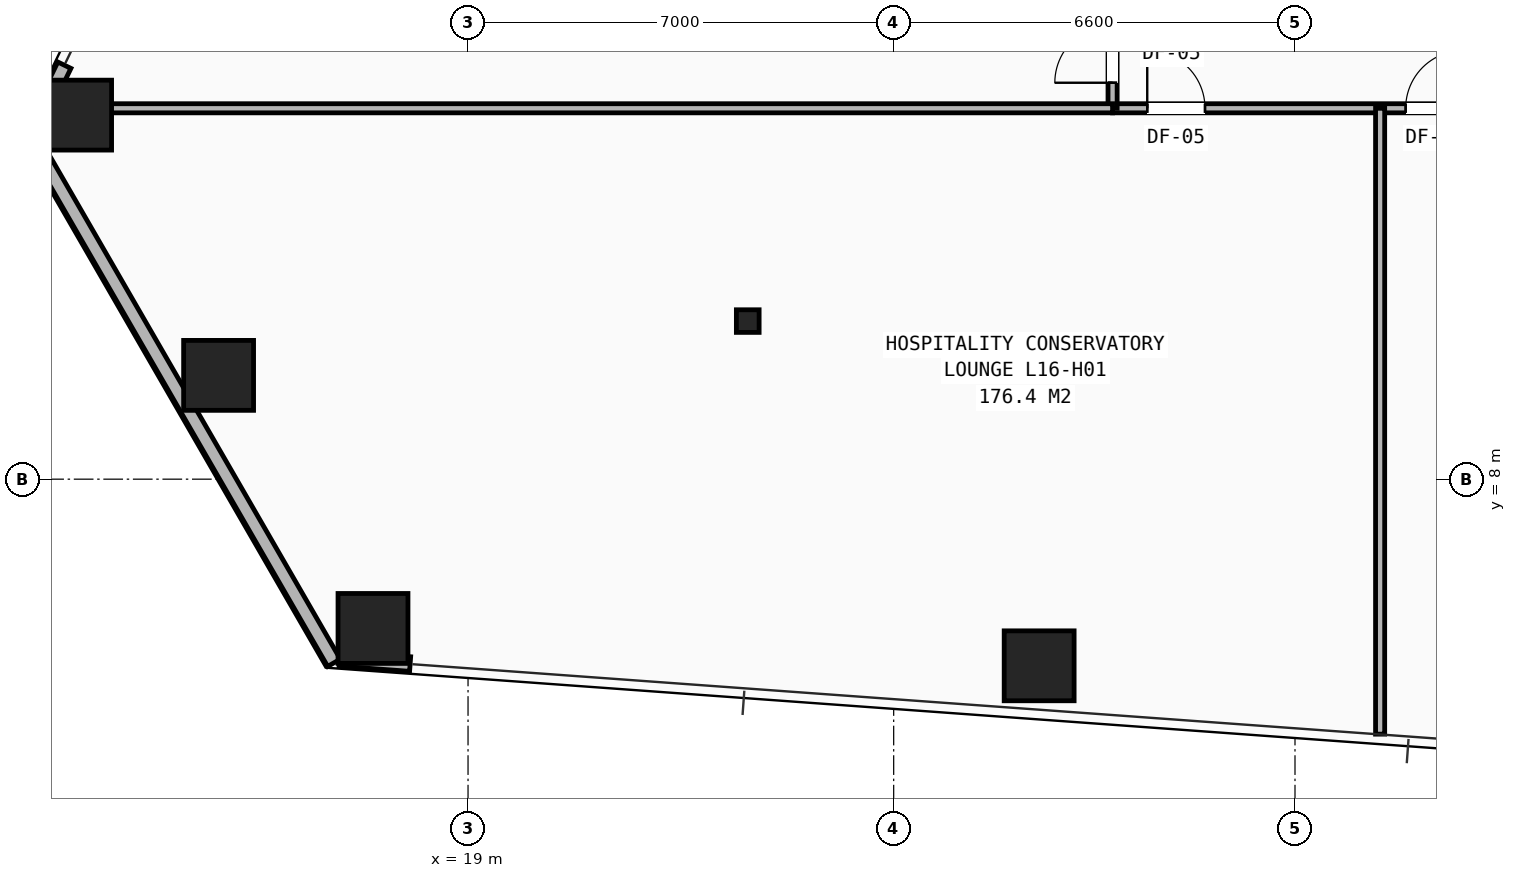
"""IFC4 building model, lengths in metres.
Left out: names, types, materials, properties, quantities, classifications, styles, units other than length and angle.
Written with IfcOpenShell. Run it as: python <this file> out.ifc"""

import sys

from ifc_helpers import new_model, si_unit, direction, frame, frame_2d, origin, origin_2d, place, context, subcontext, project, spatial, rectangle, hollow_rectangle, i_section, extrude, element, fill, save


model = new_model("IFC4")
c1 = context("Model", 3, precision=1e-05, world=origin(), true_north=direction((0.0, 1.0)))
c2 = subcontext(c1, "Body", "Model", "MODEL_VIEW")
j1 = project(units=[si_unit("LENGTHUNIT", "METRE"), si_unit("PLANEANGLEUNIT", "RADIAN")], contexts=[c1])
p1 = place(None, origin())
s1 = spatial("IfcSite", under=j1, at=p1, CompositionType="ELEMENT")
p2 = place(p1, origin())
s2 = spatial("IfcBuilding", under=s1, at=p2, CompositionType="ELEMENT")
p3 = place(p2, frame((0.0, 0.0, 59.2)))
s3 = spatial("IfcBuildingStorey", under=s2, at=p3, CompositionType="ELEMENT", Elevation=59.2)
p4 = place(p3, frame((23.6, 10.6, 0.0), z_axis=(0.0, 0.0, 1.0), x_axis=(1.0, 0.0, 0.0)))
e1 = element("IfcColumn", 1, at=p4, inside=s3, PredefinedType="COLUMN", context=c2, shape_type="SweptSolid", body=[
    extrude(i_section(OverallWidth=0.374, OverallDepth=0.372, WebThickness=0.016, FlangeThickness=0.026, at=origin_2d()), origin(), (0.0, 0.0, 1.0), 3.2),
])
for number, where, z_axis, x_axis in (
    (2, (12.563, 13.988, 0.0), (0.0, 0.0, 1.0), (1.0, 0.0, 0.0)),
    (3, (14.898, 9.707, 0.0), (0.0, 0.0, 1.0), (1.0, 0.0, 0.0)),
    (4, (17.437, 5.545, 0.0), (0.0, 0.0, 1.0), (1.0, 0.0, 0.0)),
    (5, (28.392, 4.93, 0.0), (0.0, 0.0, 1.0), (1.0, 0.0, 0.0)),
):
    element("IfcColumn", number, at=place(p3, frame(where, z_axis=z_axis, x_axis=x_axis)), inside=s3, PredefinedType="COLUMN", context=c2, shape_type="SweptSolid", body=[
        extrude(hollow_rectangle(XDim=1.15, YDim=1.15, WallThickness=0.075, at=origin_2d()), origin(), (0.0, 0.0, 1.0), 3.2),
    ])
p5 = place(p3, frame((12.361, 14.809, 0.0), z_axis=(0.0, 0.0, 1.0), x_axis=(-0.436005533542, -0.899943984213, 0.0)))
e6 = element("IfcWall", 6, at=p5, inside=s3, PredefinedType="SHEAR", context=c2, shape_type="SweptSolid", body=[
    extrude(rectangle(XDim=1.162, YDim=0.24, at=frame_2d((0.581, 0.0))), origin(), (0.0, 0.0, 1.0), 2.263),
])
p6 = place(p3, frame((16.796, 4.98, 0.0), z_axis=(0.0, 0.0, 1.0), x_axis=(-0.499984376209, 0.866034423996, 0.0)))
e7 = element("IfcWall", 7, at=p6, inside=s3, PredefinedType="SHEAR", context=c2, shape_type="SweptSolid", body=[
    extrude(rectangle(XDim=10.086, YDim=0.24, at=frame_2d((5.043, 0.0))), origin(), (0.0, 0.0, 1.0), 2.263),
])
p7 = place(p3, frame((16.888, 5.044, 0.0), z_axis=(0.0, 0.0, 1.0), x_axis=(0.997371614967, -0.072455929072, 0.0)))
e8 = element("IfcWall", 8, at=p7, inside=s3, PredefinedType="SHEAR", context=c2, shape_type="SweptSolid", body=[
    extrude(rectangle(XDim=1.163, YDim=0.24, at=frame_2d((0.581, 0.0))), origin(), (0.0, 0.0, 1.0), 2.263),
])
p8 = place(p3, frame((29.6, 14.1, 0.0), z_axis=(0.0, 0.0, 1.0), x_axis=(1.0, 0.0, 0.0)))
e9 = element("IfcWall", 9, at=p8, inside=s3, PredefinedType="PARTITIONING", context=c2, shape_type="SweptSolid", body=[
    extrude(rectangle(XDim=20.8, YDim=0.15, at=frame_2d((10.4, 0.0))), origin(), (0.0, 0.0, 1.0), 2.191),
])
p9 = place(p8, frame((0.57, 0.0, 0.0)))
e10 = element("IfcOpeningElement", 10, at=p9, cuts=e9, PredefinedType="OPENING", context=c2, shape_type="SweptSolid", body=[
    extrude(rectangle(XDim=0.95, YDim=2.1, at=frame_2d((0.475, 1.05))), frame((0.0, 0.085, 0.0), z_axis=(0.0, -1.0, 0.0), x_axis=(1.0, 0.0, 0.0)), (0.0, 0.0, 1.0), 0.17),
])
p10 = place(p8, frame((4.82, 0.0, 0.0)))
e11 = element("IfcOpeningElement", 11, at=p10, cuts=e9, PredefinedType="OPENING", context=c2, shape_type="SweptSolid", body=[
    extrude(rectangle(XDim=0.95, YDim=2.1, at=frame_2d((0.475, 1.05))), frame((0.0, 0.085, 0.0), z_axis=(0.0, -1.0, 0.0), x_axis=(1.0, 0.0, 0.0)), (0.0, 0.0, 1.0), 0.17),
])
p11 = place(p8, frame((10.82, 0.0, 0.0)))
e12 = element("IfcOpeningElement", 12, at=p11, cuts=e9, PredefinedType="OPENING", context=c2, shape_type="SweptSolid", body=[
    extrude(rectangle(XDim=0.95, YDim=2.1, at=frame_2d((0.475, 1.05))), frame((0.0, 0.085, 0.0), z_axis=(0.0, -1.0, 0.0), x_axis=(1.0, 0.0, 0.0)), (0.0, 0.0, 1.0), 0.17),
])
p12 = place(p8, frame((16.82, 0.0, 0.0)))
e13 = element("IfcOpeningElement", 13, at=p12, cuts=e9, PredefinedType="OPENING", context=c2, shape_type="SweptSolid", body=[
    extrude(rectangle(XDim=0.95, YDim=2.1, at=frame_2d((0.475, 1.05))), frame((0.0, 0.085, 0.0), z_axis=(0.0, -1.0, 0.0), x_axis=(1.0, 0.0, 0.0)), (0.0, 0.0, 1.0), 0.17),
])
p13 = place(p3, frame((29.6, 14.1, 0.0), z_axis=(0.0, 0.0, 1.0), x_axis=(0.0, 1.0, 0.0)))
e14 = element("IfcWall", 14, at=p13, inside=s3, PredefinedType="PARTITIONING", context=c2, shape_type="SweptSolid", body=[
    extrude(rectangle(XDim=21.9, YDim=0.15, at=frame_2d((10.95, 0.0))), origin(), (0.0, 0.0, 1.0), 2.191),
])
p14 = place(p13, frame((0.42, 0.0, 0.0)))
e15 = element("IfcOpeningElement", 15, at=p14, cuts=e14, PredefinedType="OPENING", context=c2, shape_type="SweptSolid", body=[
    extrude(rectangle(XDim=0.95, YDim=2.1, at=frame_2d((0.475, 1.05))), frame((0.0, 0.085, 0.0), z_axis=(0.0, -1.0, 0.0), x_axis=(1.0, 0.0, 0.0)), (0.0, 0.0, 1.0), 0.17),
])
p15 = place(p13, frame((11.12, 0.0, 0.0)))
e16 = element("IfcOpeningElement", 16, at=p15, cuts=e14, PredefinedType="OPENING", context=c2, shape_type="SweptSolid", body=[
    extrude(rectangle(XDim=0.95, YDim=2.1, at=frame_2d((0.475, 1.05))), frame((0.0, 0.085, 0.0), z_axis=(0.0, -1.0, 0.0), x_axis=(1.0, 0.0, 0.0)), (0.0, 0.0, 1.0), 0.17),
])
p16 = place(p3, frame((34.0, 3.806, 0.0), z_axis=(0.0, 0.0, 1.0), x_axis=(0.0, 1.0, 0.0)))
e17 = element("IfcWall", 17, at=p16, inside=s3, PredefinedType="PARTITIONING", context=c2, shape_type="SweptSolid", body=[
    extrude(rectangle(XDim=10.294, YDim=0.15, at=frame_2d((5.147, 0.0))), origin(), (0.0, 0.0, 1.0), 2.191),
])
p17 = place(p3, frame((12.023, 14.1, 0.0), z_axis=(0.0, 0.0, 1.0), x_axis=(1.0, 0.0, 0.0)))
e18 = element("IfcWall", 18, at=p17, inside=s3, PredefinedType="PARTITIONING", context=c2, shape_type="SweptSolid", body=[
    extrude(rectangle(XDim=17.577, YDim=0.15, at=frame_2d((8.789, 0.0))), origin(), (0.0, 0.0, 1.0), 2.191),
])
p18 = place(p9, origin())
e19 = element("IfcDoor", 19, at=p18, inside=s3, OperationType="SINGLE_SWING_LEFT", PredefinedType="DOOR", context=c2, shape_type="SweptSolid", body=[
    extrude(rectangle(XDim=0.95, YDim=2.1, at=frame_2d((0.475, 1.05))), frame((0.0, 0.025, 0.0), z_axis=(0.0, -1.0, 0.0), x_axis=(1.0, 0.0, 0.0)), (0.0, 0.0, 1.0), 0.05),
])
fill(e10, e19)
p19 = place(p10, origin())
e20 = element("IfcDoor", 20, at=p19, inside=s3, OperationType="SINGLE_SWING_RIGHT", PredefinedType="DOOR", context=c2, shape_type="SweptSolid", body=[
    extrude(rectangle(XDim=0.95, YDim=2.1, at=frame_2d((0.475, 1.05))), frame((0.0, 0.025, 0.0), z_axis=(0.0, -1.0, 0.0), x_axis=(1.0, 0.0, 0.0)), (0.0, 0.0, 1.0), 0.05),
])
fill(e11, e20)
p20 = place(p14, origin())
e21 = element("IfcDoor", 21, at=p20, inside=s3, OperationType="SINGLE_SWING_LEFT", PredefinedType="DOOR", context=c2, shape_type="SweptSolid", body=[
    extrude(rectangle(XDim=0.95, YDim=2.1, at=frame_2d((0.475, 1.05))), frame((0.0, 0.025, 0.0), z_axis=(0.0, -1.0, 0.0), x_axis=(1.0, 0.0, 0.0)), (0.0, 0.0, 1.0), 0.05),
])
fill(e15, e21)
save(model, sys.argv[1])
